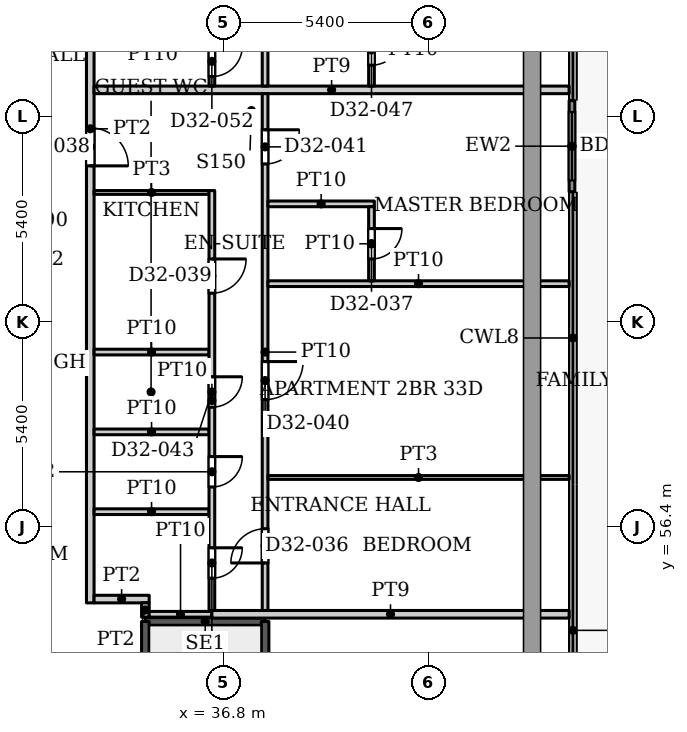
"""IFC4 building model, lengths in metres.
Left out: names, types, materials, properties, quantities, classifications, styles, units other than length and angle.
Written with IfcOpenShell. Run it as: python <this file> out.ifc"""

import sys

from ifc_helpers import new_model, si_unit, direction, frame, frame_2d, origin, place, context, subcontext, project, spatial, rectangle, extrude, source, transform, mapped, element, fill, save


model = new_model("IFC4")
c1 = context("Model", 3, precision=1e-05, world=origin(), true_north=direction((0.0, 1.0)))
c2 = subcontext(c1, "Body", "Model", "MODEL_VIEW")
j1 = project(units=[si_unit("LENGTHUNIT", "METRE"), si_unit("PLANEANGLEUNIT", "RADIAN")], contexts=[c1])
p1 = place(None, origin())
s1 = spatial("IfcSite", under=j1, at=p1, CompositionType="ELEMENT")
p2 = place(p1, origin())
s2 = spatial("IfcBuilding", under=s1, at=p2, CompositionType="ELEMENT")
p3 = place(p2, frame((0.0, 0.0, 140.9)))
s3 = spatial("IfcBuildingStorey", under=s2, at=p3, CompositionType="ELEMENT", Elevation=140.9)
p4 = place(p3, frame((45.975, 67.618, 0.0), z_axis=(0.0, 0.0, 1.0), x_axis=(0.0, -1.0, 0.0)))
e1 = element("IfcWall", 1, at=p4, inside=s3, PredefinedType="SOLIDWALL", context=c2, shape_type="SweptSolid", body=[
    extrude(rectangle(XDim=2.4, YDim=0.15, at=frame_2d((1.2, 0.0))), origin(), (0.0, 0.0, 1.0), 3.75),
])
p5 = place(p4, frame((0.3, 0.0, 0.0)))
e2 = element("IfcOpeningElement", 2, at=p5, cuts=e1, PredefinedType="OPENING", context=c2, shape_type="SweptSolid", body=[
    extrude(rectangle(XDim=1.8, YDim=2.4, at=frame_2d((0.9, 1.2))), frame((0.0, 0.085, 0.0), z_axis=(0.0, -1.0, 0.0), x_axis=(1.0, 0.0, 0.0)), (0.0, 0.0, 1.0), 0.17),
])
p6 = place(p3, frame((34.75, 53.91, 0.0), z_axis=(0.0, 0.0, 1.0), x_axis=(1.0, 0.0, 0.0)))
e3 = element("IfcWall", 3, at=p6, inside=s3, PredefinedType="SHEAR", context=c2, shape_type="SweptSolid", body=[
    extrude(rectangle(XDim=3.15, YDim=0.2, at=frame_2d((1.575, 0.0))), origin(), (0.0, 0.0, 1.0), 3.9),
])
p7 = place(p3, frame((34.75, 47.5, 0.0), z_axis=(0.0, 0.0, 1.0), x_axis=(0.0, 1.0, 0.0)))
e4 = element("IfcWall", 4, at=p7, inside=s3, PredefinedType="SHEAR", context=c2, shape_type="SweptSolid", body=[
    extrude(rectangle(XDim=6.41, YDim=0.2, at=frame_2d((3.205, 0.0))), origin(), (0.0, 0.0, 1.0), 3.9),
])
p8 = place(p3, frame((37.9, 44.75, 0.0), z_axis=(0.0, 0.0, 1.0), x_axis=(0.0, 1.0, 0.0)))
e5 = element("IfcWall", 5, at=p8, inside=s3, PredefinedType="SHEAR", context=c2, shape_type="SweptSolid", body=[
    extrude(rectangle(XDim=9.16, YDim=0.2, at=frame_2d((4.58, 0.0))), origin(), (0.0, 0.0, 1.0), 3.9),
])
p9 = place(p3, frame((33.3, 54.4, 0.0), z_axis=(0.0, 0.0, 1.0), x_axis=(0.0, 1.0, 0.0)))
e6 = element("IfcWall", 6, at=p9, inside=s3, PredefinedType="PARTITIONING", context=c2, shape_type="SweptSolid", body=[
    extrude(rectangle(XDim=24.95, YDim=0.2, at=frame_2d((12.475, 0.0))), origin(), (0.0, 0.0, 1.0), 3.6),
])
p10 = place(p9, frame((11.5, 0.0, 0.0)))
e7 = element("IfcOpeningElement", 7, at=p10, cuts=e6, PredefinedType="OPENING", context=c2, shape_type="SweptSolid", body=[
    extrude(rectangle(XDim=1.0, YDim=2.1, at=frame_2d((0.5, 1.05))), frame((0.0, 0.11, 0.0), z_axis=(0.0, -1.0, 0.0), x_axis=(1.0, 0.0, 0.0)), (0.0, 0.0, 1.0), 0.22),
])
p11 = place(p9, frame((18.7, 0.0, 0.0)))
e8 = element("IfcOpeningElement", 8, at=p11, cuts=e6, PredefinedType="OPENING", context=c2, shape_type="SweptSolid", body=[
    extrude(rectangle(XDim=1.0, YDim=2.1, at=frame_2d((0.5, 1.05))), frame((0.0, 0.11, 0.0), z_axis=(0.0, -1.0, 0.0), x_axis=(1.0, 0.0, 0.0)), (0.0, 0.0, 1.0), 0.22),
])
p12 = place(p3, frame((33.4, 54.5, 0.0), z_axis=(0.0, 0.0, 1.0), x_axis=(1.0, 0.0, 0.0)))
e9 = element("IfcWall", 9, at=p12, inside=s3, PredefinedType="PARTITIONING", context=c2, shape_type="SweptSolid", body=[
    extrude(rectangle(XDim=1.45, YDim=0.2, at=frame_2d((0.725, 0.0))), origin(), (0.0, 0.0, 1.0), 3.6),
])
for number, where, z_axis, x_axis in (
    (10, (33.4, 56.8, 0.0), (0.0, 0.0, 1.0), (1.0, 0.0, 0.0)),
    (11, (33.4, 58.9, 0.0), (0.0, 0.0, 1.0), (1.0, 0.0, 0.0)),
    (12, (33.4, 61.0, 0.0), (0.0, 0.0, 1.0), (1.0, 0.0, 0.0)),
):
    element("IfcWall", number, at=place(p3, frame(where, z_axis=z_axis, x_axis=x_axis)), inside=s3, PredefinedType="PARTITIONING", context=c2, shape_type="SweptSolid", body=[
        extrude(rectangle(XDim=3.025, YDim=0.15, at=frame_2d((1.513, 0.0))), origin(), (0.0, 0.0, 1.0), 3.6),
    ])
p13 = place(p3, frame((33.4, 65.2, 0.0), z_axis=(0.0, 0.0, 1.0), x_axis=(1.0, 0.0, 0.0)))
e13 = element("IfcWall", 13, at=p13, inside=s3, PredefinedType="PARTITIONING", context=c2, shape_type="SweptSolid", body=[
    extrude(rectangle(XDim=3.025, YDim=0.1, at=frame_2d((1.513, 0.0))), origin(), (0.0, 0.0, 1.0), 3.6),
])
p14 = place(p3, frame((33.4, 67.9, 0.0), z_axis=(0.0, 0.0, 1.0), x_axis=(1.0, 0.0, 0.0)))
e14 = element("IfcWall", 14, at=p14, inside=s3, PredefinedType="PARTITIONING", context=c2, shape_type="SweptSolid", body=[
    extrude(rectangle(XDim=12.5, YDim=0.2, at=frame_2d((6.25, 0.0))), origin(), (0.0, 0.0, 1.0), 3.6),
])
p15 = place(p3, frame((34.75, 54.025, 0.0), z_axis=(0.0, 0.0, 1.0), x_axis=(0.0, 1.0, 0.0)))
e15 = element("IfcWall", 15, at=p15, inside=s3, PredefinedType="PARTITIONING", context=c2, shape_type="SweptSolid", body=[
    extrude(rectangle(XDim=0.375, YDim=0.2, at=frame_2d((0.188, 0.0))), origin(), (0.0, 0.0, 1.0), 3.6),
])
p16 = place(p3, frame((34.85, 54.1, 0.0), z_axis=(0.0, 0.0, 1.0), x_axis=(1.0, 0.0, 0.0)))
e16 = element("IfcWall", 16, at=p16, inside=s3, PredefinedType="PARTITIONING", context=c2, shape_type="SweptSolid", body=[
    extrude(rectangle(XDim=1.65, YDim=0.15, at=frame_2d((0.825, 0.0))), origin(), (0.0, 0.0, 1.0), 3.6),
])
p17 = place(p3, frame((36.5, 54.1, 0.0), z_axis=(0.0, 0.0, 1.0), x_axis=(1.0, 0.0, 0.0)))
e17 = element("IfcWall", 17, at=p17, inside=s3, PredefinedType="PARTITIONING", context=c2, shape_type="SweptSolid", body=[
    extrude(rectangle(XDim=9.4, YDim=0.2, at=frame_2d((4.7, 0.0))), origin(), (0.0, 0.0, 1.0), 3.6),
])
p18 = place(p3, frame((36.5, 54.2, 0.0), z_axis=(0.0, 0.0, 1.0), x_axis=(0.0, 1.0, 0.0)))
e18 = element("IfcWall", 18, at=p18, inside=s3, PredefinedType="PARTITIONING", context=c2, shape_type="SweptSolid", body=[
    extrude(rectangle(XDim=11.05, YDim=0.15, at=frame_2d((5.525, 0.0))), origin(), (0.0, 0.0, 1.0), 3.6),
])
p19 = place(p18, frame((0.85, 0.0, 0.0)))
e19 = element("IfcOpeningElement", 19, at=p19, cuts=e18, PredefinedType="OPENING", context=c2, shape_type="SweptSolid", body=[
    extrude(rectangle(XDim=0.8, YDim=2.1, at=frame_2d((0.4, 1.05))), frame((0.0, 0.085, 0.0), z_axis=(0.0, -1.0, 0.0), x_axis=(1.0, 0.0, 0.0)), (0.0, 0.0, 1.0), 0.17),
])
p20 = place(p18, frame((8.35, 0.0, 0.0)))
e20 = element("IfcOpeningElement", 20, at=p20, cuts=e18, PredefinedType="OPENING", context=c2, shape_type="SweptSolid", body=[
    extrude(rectangle(XDim=0.9, YDim=2.1, at=frame_2d((0.45, 1.05))), frame((0.0, 0.085, 0.0), z_axis=(0.0, -1.0, 0.0), x_axis=(1.0, 0.0, 0.0)), (0.0, 0.0, 1.0), 0.17),
])
p21 = place(p18, frame((3.25, 0.0, 0.0)))
e21 = element("IfcOpeningElement", 21, at=p21, cuts=e18, PredefinedType="OPENING", context=c2, shape_type="SweptSolid", body=[
    extrude(rectangle(XDim=0.8, YDim=2.1, at=frame_2d((0.4, 1.05))), frame((0.0, 0.085, 0.0), z_axis=(0.0, -1.0, 0.0), x_axis=(1.0, 0.0, 0.0)), (0.0, 0.0, 1.0), 0.17),
])
p22 = place(p18, frame((5.35, 0.0, 0.0)))
e22 = element("IfcOpeningElement", 22, at=p22, cuts=e18, PredefinedType="OPENING", context=c2, shape_type="SweptSolid", body=[
    extrude(rectangle(XDim=0.8, YDim=2.1, at=frame_2d((0.4, 1.05))), frame((0.0, 0.085, 0.0), z_axis=(0.0, -1.0, 0.0), x_axis=(1.0, 0.0, 0.0)), (0.0, 0.0, 1.0), 0.17),
])
p23 = place(p3, frame((36.5, 68.0, 0.0), z_axis=(0.0, 0.0, 1.0), x_axis=(0.0, 1.0, 0.0)))
e23 = element("IfcWall", 23, at=p23, inside=s3, PredefinedType="PARTITIONING", context=c2, shape_type="SweptSolid", body=[
    extrude(rectangle(XDim=4.75, YDim=0.15, at=frame_2d((2.375, 0.0))), origin(), (0.0, 0.0, 1.0), 3.6),
])
p24 = place(p23, frame((2.6, 0.0, 0.0)))
e24 = element("IfcOpeningElement", 24, at=p24, cuts=e23, PredefinedType="OPENING", context=c2, shape_type="SweptSolid", body=[
    extrude(rectangle(XDim=0.9, YDim=2.1, at=frame_2d((0.45, 1.05))), frame((0.0, 0.085, 0.0), z_axis=(0.0, -1.0, 0.0), x_axis=(1.0, 0.0, 0.0)), (0.0, 0.0, 1.0), 0.17),
])
p25 = place(p23, frame((0.25, 0.0, 0.0)))
e25 = element("IfcOpeningElement", 25, at=p25, cuts=e23, PredefinedType="OPENING", context=c2, shape_type="SweptSolid", body=[
    extrude(rectangle(XDim=0.8, YDim=2.1, at=frame_2d((0.4, 1.05))), frame((0.0, 0.085, 0.0), z_axis=(0.0, -1.0, 0.0), x_axis=(1.0, 0.0, 0.0)), (0.0, 0.0, 1.0), 0.17),
])
p26 = place(p3, frame((37.9, 54.2, 0.0), z_axis=(0.0, 0.0, 1.0), x_axis=(0.0, 1.0, 0.0)))
e26 = element("IfcWall", 26, at=p26, inside=s3, PredefinedType="PARTITIONING", context=c2, shape_type="SweptSolid", body=[
    extrude(rectangle(XDim=13.6, YDim=0.15, at=frame_2d((6.8, 0.0))), origin(), (0.0, 0.0, 1.0), 3.6),
])
p27 = place(p26, frame((1.25, 0.0, 0.0)))
e27 = element("IfcOpeningElement", 27, at=p27, cuts=e26, PredefinedType="OPENING", context=c2, shape_type="SweptSolid", body=[
    extrude(rectangle(XDim=0.9, YDim=2.1, at=frame_2d((0.45, 1.05))), frame((0.0, 0.085, 0.0), z_axis=(0.0, -1.0, 0.0), x_axis=(1.0, 0.0, 0.0)), (0.0, 0.0, 1.0), 0.17),
])
p28 = place(p26, frame((5.55, 0.0, 0.0)))
e28 = element("IfcOpeningElement", 28, at=p28, cuts=e26, PredefinedType="OPENING", context=c2, shape_type="SweptSolid", body=[
    extrude(rectangle(XDim=1.0, YDim=2.1, at=frame_2d((0.5, 1.05))), frame((0.0, 0.085, 0.0), z_axis=(0.0, -1.0, 0.0), x_axis=(1.0, 0.0, 0.0)), (0.0, 0.0, 1.0), 0.17),
])
p29 = place(p26, frame((11.75, 0.0, 0.0)))
e29 = element("IfcOpeningElement", 29, at=p29, cuts=e26, PredefinedType="OPENING", context=c2, shape_type="SweptSolid", body=[
    extrude(rectangle(XDim=0.9, YDim=2.1, at=frame_2d((0.45, 1.05))), frame((0.0, 0.085, 0.0), z_axis=(0.0, -1.0, 0.0), x_axis=(1.0, 0.0, 0.0)), (0.0, 0.0, 1.0), 0.17),
])
p30 = place(p3, frame((37.9, 68.0, 0.0), z_axis=(0.0, 0.0, 1.0), x_axis=(0.0, 1.0, 0.0)))
e30 = element("IfcWall", 30, at=p30, inside=s3, PredefinedType="PARTITIONING", context=c2, shape_type="SweptSolid", body=[
    extrude(rectangle(XDim=11.25, YDim=0.15, at=frame_2d((5.625, 0.0))), origin(), (0.0, 0.0, 1.0), 3.6),
])
p31 = place(p30, frame((9.2, 0.0, 0.0)))
e31 = element("IfcOpeningElement", 31, at=p31, cuts=e30, PredefinedType="OPENING", context=c2, shape_type="SweptSolid", body=[
    extrude(rectangle(XDim=0.9, YDim=2.1, at=frame_2d((0.45, 1.05))), frame((0.0, 0.085, 0.0), z_axis=(0.0, -1.0, 0.0), x_axis=(1.0, 0.0, 0.0)), (0.0, 0.0, 1.0), 0.17),
])
p32 = place(p30, frame((5.4, 0.0, 0.0)))
e32 = element("IfcOpeningElement", 32, at=p32, cuts=e30, PredefinedType="OPENING", context=c2, shape_type="SweptSolid", body=[
    extrude(rectangle(XDim=1.0, YDim=2.1, at=frame_2d((0.5, 1.05))), frame((0.0, 0.085, 0.0), z_axis=(0.0, -1.0, 0.0), x_axis=(1.0, 0.0, 0.0)), (0.0, 0.0, 1.0), 0.17),
])
p33 = place(p30, frame((2.45, 0.0, 0.0)))
e33 = element("IfcOpeningElement", 33, at=p33, cuts=e30, PredefinedType="OPENING", context=c2, shape_type="SweptSolid", body=[
    extrude(rectangle(XDim=0.9, YDim=2.1, at=frame_2d((0.45, 1.05))), frame((0.0, 0.085, 0.0), z_axis=(0.0, -1.0, 0.0), x_axis=(1.0, 0.0, 0.0)), (0.0, 0.0, 1.0), 0.17),
])
p34 = place(p3, frame((37.975, 57.7, 0.0), z_axis=(0.0, 0.0, 1.0), x_axis=(1.0, 0.0, 0.0)))
e34 = element("IfcWall", 34, at=p34, inside=s3, PredefinedType="PARTITIONING", context=c2, shape_type="SweptSolid", body=[
    extrude(rectangle(XDim=7.925, YDim=0.1, at=frame_2d((3.962, 0.0))), origin(), (0.0, 0.0, 1.0), 3.6),
])
p35 = place(p3, frame((37.975, 62.8, 0.0), z_axis=(0.0, 0.0, 1.0), x_axis=(1.0, 0.0, 0.0)))
e35 = element("IfcWall", 35, at=p35, inside=s3, PredefinedType="PARTITIONING", context=c2, shape_type="SweptSolid", body=[
    extrude(rectangle(XDim=7.925, YDim=0.15, at=frame_2d((3.962, 0.0))), origin(), (0.0, 0.0, 1.0), 3.6),
])
p36 = place(p3, frame((37.975, 64.9, 0.0), z_axis=(0.0, 0.0, 1.0), x_axis=(1.0, 0.0, 0.0)))
e36 = element("IfcWall", 36, at=p36, inside=s3, PredefinedType="PARTITIONING", context=c2, shape_type="SweptSolid", body=[
    extrude(rectangle(XDim=2.8, YDim=0.15, at=frame_2d((1.4, 0.0))), origin(), (0.0, 0.0, 1.0), 3.6),
])
p37 = place(p3, frame((40.7, 62.875, 0.0), z_axis=(0.0, 0.0, 1.0), x_axis=(0.0, 1.0, 0.0)))
e37 = element("IfcWall", 37, at=p37, inside=s3, PredefinedType="PARTITIONING", context=c2, shape_type="SweptSolid", body=[
    extrude(rectangle(XDim=1.95, YDim=0.15, at=frame_2d((0.975, 0.0))), origin(), (0.0, 0.0, 1.0), 3.6),
])
p38 = place(p37, frame((0.575, 0.0, 0.0)))
e38 = element("IfcOpeningElement", 38, at=p38, cuts=e37, PredefinedType="OPENING", context=c2, shape_type="SweptSolid", body=[
    extrude(rectangle(XDim=0.8, YDim=2.1, at=frame_2d((0.4, 1.05))), frame((0.0, 0.085, 0.0), z_axis=(0.0, -1.0, 0.0), x_axis=(1.0, 0.0, 0.0)), (0.0, 0.0, 1.0), 0.17),
])
p39 = place(p3, frame((40.7, 68.0, 0.0), z_axis=(0.0, 0.0, 1.0), x_axis=(0.0, 1.0, 0.0)))
e39 = element("IfcWall", 39, at=p39, inside=s3, PredefinedType="PARTITIONING", context=c2, shape_type="SweptSolid", body=[
    extrude(rectangle(XDim=1.925, YDim=0.15, at=frame_2d((0.962, 0.0))), origin(), (0.0, 0.0, 1.0), 3.6),
])
p40 = place(p39, frame((0.55, 0.0, 0.0)))
e40 = element("IfcOpeningElement", 40, at=p40, cuts=e39, PredefinedType="OPENING", context=c2, shape_type="SweptSolid", body=[
    extrude(rectangle(XDim=0.8, YDim=2.1, at=frame_2d((0.4, 1.05))), frame((0.0, 0.085, 0.0), z_axis=(0.0, -1.0, 0.0), x_axis=(1.0, 0.0, 0.0)), (0.0, 0.0, 1.0), 0.17),
])
m1 = source(origin(), c2, "Body", "SweptSolid", [
    extrude(rectangle(XDim=1.8, YDim=2.4, at=frame_2d((0.9, 1.2))), frame((0.0, 0.025, 0.0), z_axis=(0.0, -1.0, 0.0), x_axis=(1.0, 0.0, 0.0)), (0.0, 0.0, 1.0), 0.05),
])
p41 = place(p5, origin())
e41 = element("IfcDoor", 41, at=p41, inside=s3, OperationType="SLIDING_TO_LEFT", PredefinedType="DOOR", context=c2, shape_type="MappedRepresentation", body=[
    mapped(m1, transform((0.0, 0.0, 0.0), x_axis=(1.0, 0.0, 0.0), y_axis=(0.0, 1.0, 0.0), z_axis=(0.0, 0.0, 1.0), scale=1.0)),
])
fill(e2, e41)
m2 = source(origin(), c2, "Body", "SweptSolid", [
    extrude(rectangle(XDim=0.8, YDim=2.1, at=frame_2d((0.4, 1.05))), frame((0.0, 0.025, 0.0), z_axis=(0.0, -1.0, 0.0), x_axis=(1.0, 0.0, 0.0)), (0.0, 0.0, 1.0), 0.05),
])
p42 = place(p19, origin())
e42 = element("IfcDoor", 42, at=p42, inside=s3, OperationType="SINGLE_SWING_RIGHT", PredefinedType="DOOR", context=c2, shape_type="MappedRepresentation", body=[
    mapped(m2, transform((0.0, 0.0, 0.0), x_axis=(1.0, 0.0, 0.0), y_axis=(0.0, 1.0, 0.0), z_axis=(0.0, 0.0, 1.0), scale=1.0)),
])
fill(e19, e42)
m3 = source(origin(), c2, "Body", "SweptSolid", [
    extrude(rectangle(XDim=0.9, YDim=2.1, at=frame_2d((0.45, 1.05))), frame((0.0, 0.025, 0.0), z_axis=(0.0, -1.0, 0.0), x_axis=(1.0, 0.0, 0.0)), (0.0, 0.0, 1.0), 0.05),
])
p43 = place(p27, origin())
e43 = element("IfcDoor", 43, at=p43, inside=s3, OperationType="SINGLE_SWING_LEFT", PredefinedType="DOOR", context=c2, shape_type="MappedRepresentation", body=[
    mapped(m3, transform((0.0, 0.0, 0.0), x_axis=(1.0, 0.0, 0.0), y_axis=(0.0, 1.0, 0.0), z_axis=(0.0, 0.0, 1.0), scale=1.0)),
])
fill(e27, e43)
p44 = place(p38, origin())
e44 = element("IfcDoor", 44, at=p44, inside=s3, OperationType="SINGLE_SWING_RIGHT", PredefinedType="DOOR", context=c2, shape_type="MappedRepresentation", body=[
    mapped(m2, transform((0.0, 0.0, 0.0), x_axis=(1.0, 0.0, 0.0), y_axis=(0.0, 1.0, 0.0), z_axis=(0.0, 0.0, 1.0), scale=1.0)),
])
fill(e38, e44)
m4 = source(origin(), c2, "Body", "SweptSolid", [
    extrude(rectangle(XDim=1.0, YDim=2.1, at=frame_2d((0.5, 1.05))), frame((0.0, 0.025, 0.0), z_axis=(0.0, -1.0, 0.0), x_axis=(1.0, 0.0, 0.0)), (0.0, 0.0, 1.0), 0.05),
])
p45 = place(p10, origin())
e45 = element("IfcDoor", 45, at=p45, inside=s3, OperationType="SINGLE_SWING_RIGHT", PredefinedType="DOOR", context=c2, shape_type="MappedRepresentation", body=[
    mapped(m4, transform((0.0, 0.0, 0.0), x_axis=(1.0, 0.0, 0.0), y_axis=(0.0, 1.0, 0.0), z_axis=(0.0, 0.0, 1.0), scale=1.0)),
])
fill(e7, e45)
p46 = place(p20, origin())
e46 = element("IfcDoor", 46, at=p46, inside=s3, OperationType="SINGLE_SWING_RIGHT", PredefinedType="DOOR", context=c2, shape_type="MappedRepresentation", body=[
    mapped(m3, transform((0.0, 0.0, 0.0), x_axis=(1.0, 0.0, 0.0), y_axis=(0.0, 1.0, 0.0), z_axis=(0.0, 0.0, 1.0), scale=1.0)),
])
fill(e20, e46)
m5 = source(origin(), c2, "Body", "SweptSolid", [
    extrude(rectangle(XDim=1.0, YDim=2.1, at=frame_2d((0.5, 1.05))), frame((0.0, 0.025, 0.0), z_axis=(0.0, -1.0, 0.0), x_axis=(1.0, 0.0, 0.0)), (0.0, 0.0, 1.0), 0.05),
])
p47 = place(p28, origin())
e47 = element("IfcDoor", 47, at=p47, inside=s3, OperationType="SINGLE_SWING_RIGHT", PredefinedType="DOOR", context=c2, shape_type="MappedRepresentation", body=[
    mapped(m5, transform((0.0, 0.0, 0.0), x_axis=(1.0, 0.0, 0.0), y_axis=(0.0, 1.0, 0.0), z_axis=(0.0, 0.0, 1.0), scale=1.0)),
])
fill(e28, e47)
p48 = place(p29, origin())
e48 = element("IfcDoor", 48, at=p48, inside=s3, OperationType="SINGLE_SWING_RIGHT", PredefinedType="DOOR", context=c2, shape_type="MappedRepresentation", body=[
    mapped(m3, transform((0.0, 0.0, 0.0), x_axis=(1.0, 0.0, 0.0), y_axis=(0.0, 1.0, 0.0), z_axis=(0.0, 0.0, 1.0), scale=1.0)),
])
fill(e29, e48)
p49 = place(p21, origin())
e49 = element("IfcDoor", 49, at=p49, inside=s3, OperationType="SINGLE_SWING_RIGHT", PredefinedType="DOOR", context=c2, shape_type="MappedRepresentation", body=[
    mapped(m2, transform((0.0, 0.0, 0.0), x_axis=(1.0, 0.0, 0.0), y_axis=(0.0, 1.0, 0.0), z_axis=(0.0, 0.0, 1.0), scale=1.0)),
])
fill(e21, e49)
p50 = place(p22, origin())
e50 = element("IfcDoor", 50, at=p50, inside=s3, OperationType="SINGLE_SWING_RIGHT", PredefinedType="DOOR", context=c2, shape_type="MappedRepresentation", body=[
    mapped(m2, transform((0.0, 0.0, 0.0), x_axis=(1.0, 0.0, 0.0), y_axis=(0.0, 1.0, 0.0), z_axis=(0.0, 0.0, 1.0), scale=1.0)),
])
fill(e22, e50)
p51 = place(p40, origin())
e51 = element("IfcDoor", 51, at=p51, inside=s3, OperationType="SINGLE_SWING_RIGHT", PredefinedType="DOOR", context=c2, shape_type="MappedRepresentation", body=[
    mapped(m2, transform((0.0, 0.0, 0.0), x_axis=(1.0, 0.0, 0.0), y_axis=(0.0, 1.0, 0.0), z_axis=(0.0, 0.0, 1.0), scale=1.0)),
])
fill(e40, e51)
p52 = place(p25, origin())
e52 = element("IfcDoor", 52, at=p52, inside=s3, OperationType="SINGLE_SWING_RIGHT", PredefinedType="DOOR", context=c2, shape_type="MappedRepresentation", body=[
    mapped(m2, transform((0.0, 0.0, 0.0), x_axis=(1.0, 0.0, 0.0), y_axis=(0.0, 1.0, 0.0), z_axis=(0.0, 0.0, 1.0), scale=1.0)),
])
fill(e25, e52)
save(model, sys.argv[1])
